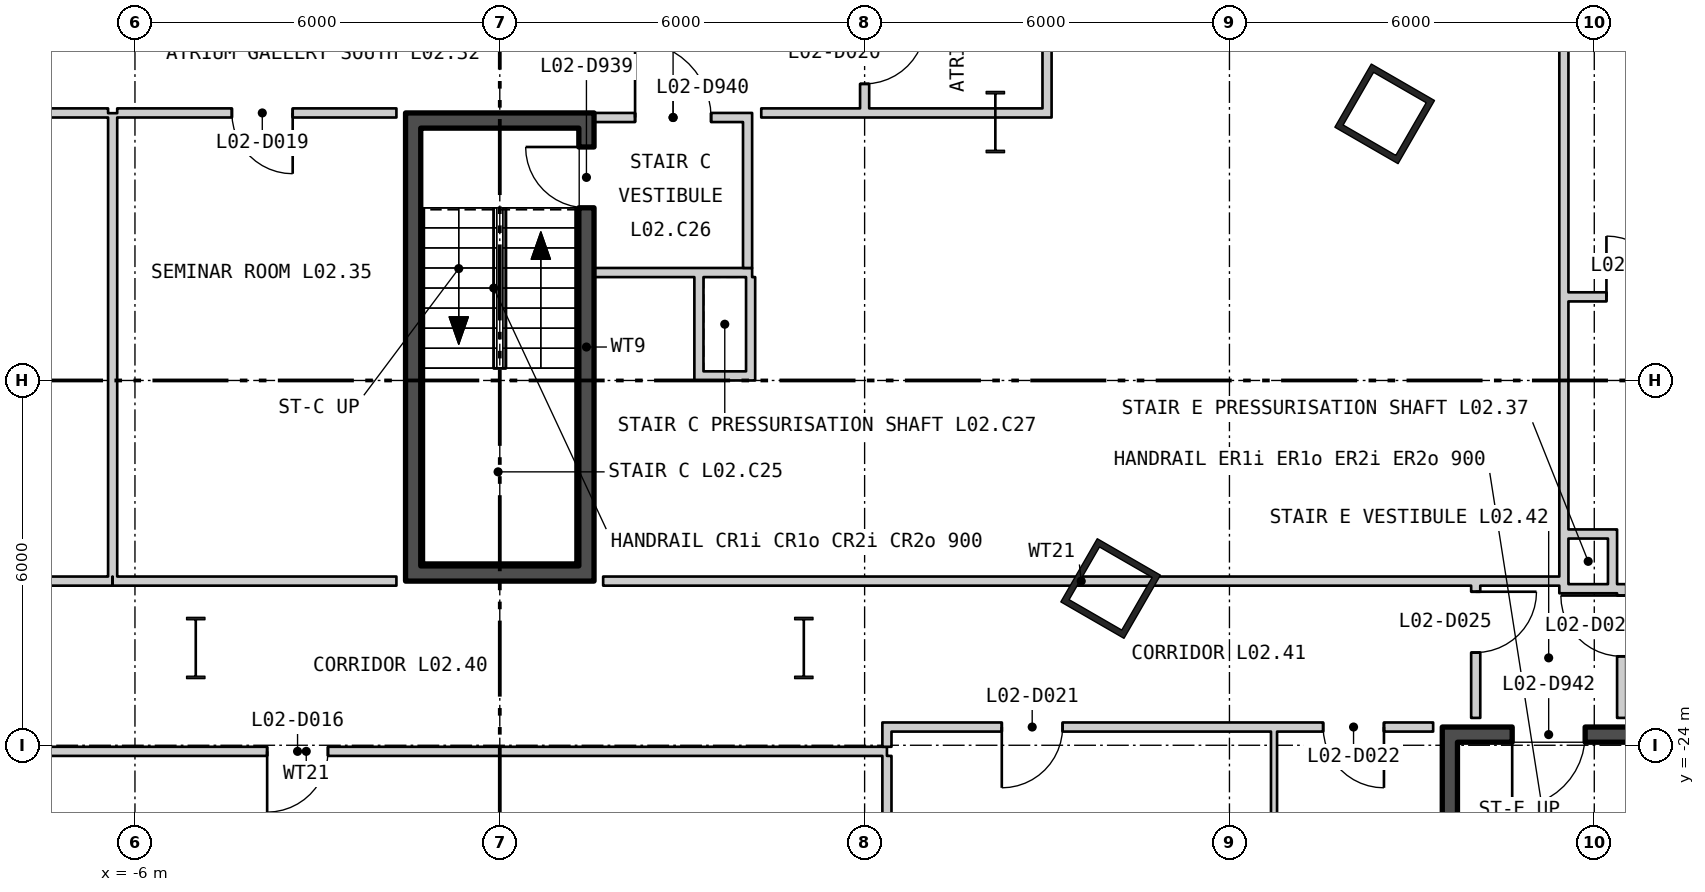
"""IFC4 building model, lengths in metres.
Left out: names, types, materials, properties, quantities, classifications, styles, units other than length and angle.
Written with IfcOpenShell. Run it as: python <this file> out.ifc"""

import sys

from ifc_helpers import new_model, si_unit, direction, frame, frame_2d, origin, origin_2d, place, context, subcontext, project, spatial, rectangle, hollow_rectangle, i_section, extrude, element, fill, save


model = new_model("IFC4")
c1 = context("Model", 3, precision=1e-05, world=origin(), true_north=direction((0.0, 1.0)))
c2 = subcontext(c1, "Body", "Model", "MODEL_VIEW")
j1 = project(units=[si_unit("LENGTHUNIT", "METRE"), si_unit("PLANEANGLEUNIT", "RADIAN")], contexts=[c1])
p1 = place(None, origin())
s1 = spatial("IfcSite", under=j1, at=p1, CompositionType="ELEMENT")
p2 = place(p1, origin())
s2 = spatial("IfcBuilding", under=s1, at=p2, CompositionType="ELEMENT")
p3 = place(p2, frame((0.0, 0.0, 13.5)))
s3 = spatial("IfcBuildingStorey", under=s2, at=p3, CompositionType="ELEMENT", Elevation=13.5)
for number, where, z_axis, x_axis in (
    (1, (10.046, -21.422, 0.0), (0.0, 0.0, 1.0), (0.5, 0.866, 0.0)),
    (2, (14.553, -13.615, 0.0), (0.0, 0.0, 1.0), (0.5, 0.866, 0.0)),
):
    element("IfcColumn", number, at=place(p3, frame(where, z_axis=z_axis, x_axis=x_axis)), inside=s3, PredefinedType="COLUMN", context=c2, shape_type="SweptSolid", body=[
        extrude(hollow_rectangle(XDim=1.2, YDim=1.2, WallThickness=0.1, at=origin_2d()), origin(), (0.0, 0.0, 1.0), 5.1),
    ])
for number, where, z_axis, x_axis in (
    (3, (8.15, -13.75, 0.0), (0.0, 0.0, 1.0), (1.0, 0.0, 0.0)),
    (4, (5.0, -22.4, 0.0), (0.0, 0.0, 1.0), (1.0, 0.0, 0.0)),
    (5, (-5.0, -22.4, 0.0), (0.0, 0.0, 1.0), (1.0, 0.0, 0.0)),
):
    element("IfcColumn", number, at=place(p3, frame(where, z_axis=z_axis, x_axis=x_axis)), inside=s3, PredefinedType="COLUMN", context=c2, shape_type="SweptSolid", body=[
        extrude(i_section(OverallWidth=0.302, OverallDepth=1.008, WebThickness=0.021, FlangeThickness=0.04, at=origin_2d()), origin(), (0.0, 0.0, 1.0), 5.1),
    ])
p4 = place(p3, frame((-1.425, -21.05, 0.0), z_axis=(0.0, 0.0, 1.0), x_axis=(0.0, 1.0, 0.0)))
e6 = element("IfcWall", 6, at=p4, inside=s3, PredefinedType="SHEAR", context=c2, shape_type="SweptSolid", body=[
    extrude(rectangle(XDim=7.2, YDim=0.25, at=frame_2d((3.6, 0.0))), origin(), (0.0, 0.0, 1.0), 4.88),
])
p5 = place(p3, frame((1.425, -21.05, 0.0), z_axis=(0.0, 0.0, 1.0), x_axis=(0.0, 1.0, 0.0)))
e7 = element("IfcWall", 7, at=p5, inside=s3, PredefinedType="SHEAR", context=c2, shape_type="SweptSolid", body=[
    extrude(rectangle(XDim=7.2, YDim=0.25, at=frame_2d((3.6, 0.0))), origin(), (0.0, 0.0, 1.0), 4.88),
])
p6 = place(p5, frame((5.89, 0.0, 0.0)))
e8 = element("IfcOpeningElement", 8, at=p6, cuts=e7, PredefinedType="OPENING", context=c2, shape_type="SweptSolid", body=[
    extrude(rectangle(XDim=1.0, YDim=2.1, at=frame_2d((0.5, 1.05))), frame((0.0, 0.135, 0.0), z_axis=(0.0, -1.0, 0.0), x_axis=(1.0, 0.0, 0.0)), (0.0, 0.0, 1.0), 0.27),
])
for number, where, z_axis, x_axis in (
    (9, (-1.55, -21.175, 0.0), (0.0, 0.0, 1.0), (1.0, 0.0, 0.0)),
    (10, (-1.55, -13.725, 0.0), (0.0, 0.0, 1.0), (1.0, 0.0, 0.0)),
):
    element("IfcWall", number, at=place(p3, frame(where, z_axis=z_axis, x_axis=x_axis)), inside=s3, PredefinedType="SHEAR", context=c2, shape_type="SweptSolid", body=[
        extrude(rectangle(XDim=3.1, YDim=0.25, at=frame_2d((1.55, 0.0))), origin(), (0.0, 0.0, 1.0), 4.88),
    ])
p7 = place(p3, frame((1.55, -16.225, 0.0), z_axis=(0.0, 0.0, 1.0), x_axis=(1.0, 0.0, 0.0)))
e11 = element("IfcWall", 11, at=p7, inside=s3, PredefinedType="PARTITIONING", context=c2, shape_type="SweptSolid", body=[
    extrude(rectangle(XDim=2.6, YDim=0.15, at=frame_2d((1.3, 0.0))), origin(), (0.0, 0.0, 1.0), 4.88),
])
p8 = place(p3, frame((4.075, -16.15, 0.0), z_axis=(0.0, 0.0, 1.0), x_axis=(0.0, 1.0, 0.0)))
e12 = element("IfcWall", 12, at=p8, inside=s3, PredefinedType="PARTITIONING", context=c2, shape_type="SweptSolid", body=[
    extrude(rectangle(XDim=2.4, YDim=0.15, at=frame_2d((1.2, 0.0))), origin(), (0.0, 0.0, 1.0), 4.88),
])
p9 = place(p3, frame((1.55, -13.675, 0.0), z_axis=(0.0, 0.0, 1.0), x_axis=(1.0, 0.0, 0.0)))
e13 = element("IfcWall", 13, at=p9, inside=s3, PredefinedType="PARTITIONING", context=c2, shape_type="SweptSolid", body=[
    extrude(rectangle(XDim=2.6, YDim=0.15, at=frame_2d((1.3, 0.0))), origin(), (0.0, 0.0, 1.0), 3.97),
])
p10 = place(p9, frame((0.675, 0.0, 0.0)))
e14 = element("IfcOpeningElement", 14, at=p10, cuts=e13, PredefinedType="OPENING", context=c2, shape_type="SweptSolid", body=[
    extrude(rectangle(XDim=1.25, YDim=2.1, at=frame_2d((0.625, 1.05))), frame((0.0, 0.085, 0.0), z_axis=(0.0, -1.0, 0.0), x_axis=(1.0, 0.0, 0.0)), (0.0, 0.0, 1.0), 0.17),
])
p11 = place(p3, frame((3.275, -18.0, 0.0), z_axis=(0.0, 0.0, 1.0), x_axis=(0.0, 1.0, 0.0)))
e15 = element("IfcWall", 15, at=p11, inside=s3, PredefinedType="PARTITIONING", context=c2, shape_type="SweptSolid", body=[
    extrude(rectangle(XDim=1.7, YDim=0.15, at=frame_2d((0.85, 0.0))), origin(), (0.0, 0.0, 1.0), 4.28),
])
p12 = place(p3, frame((3.35, -17.925, 0.0), z_axis=(0.0, 0.0, 1.0), x_axis=(1.0, 0.0, 0.0)))
e16 = element("IfcWall", 16, at=p12, inside=s3, PredefinedType="PARTITIONING", context=c2, shape_type="SweptSolid", body=[
    extrude(rectangle(XDim=0.7, YDim=0.15, at=frame_2d((0.35, 0.0))), origin(), (0.0, 0.0, 1.0), 4.88),
])
p13 = place(p3, frame((4.125, -18.0, 0.0), z_axis=(0.0, 0.0, 1.0), x_axis=(0.0, 1.0, 0.0)))
e17 = element("IfcWall", 17, at=p13, inside=s3, PredefinedType="PARTITIONING", context=c2, shape_type="SweptSolid", body=[
    extrude(rectangle(XDim=1.7, YDim=0.15, at=frame_2d((0.85, 0.0))), origin(), (0.0, 0.0, 1.0), 4.88),
])
p14 = place(p3, frame((15.625, -31.25, 0.0), z_axis=(0.0, 0.0, 1.0), x_axis=(0.0, 1.0, 0.0)))
e18 = element("IfcWall", 18, at=p14, inside=s3, PredefinedType="SHEAR", context=c2, shape_type="SweptSolid", body=[
    extrude(rectangle(XDim=7.3, YDim=0.25, at=frame_2d((3.65, 0.0))), origin(), (0.0, 0.0, 1.0), 4.88),
])
p15 = place(p3, frame((15.5, -23.825, 0.0), z_axis=(0.0, 0.0, 1.0), x_axis=(1.0, 0.0, 0.0)))
e19 = element("IfcWall", 19, at=p15, inside=s3, PredefinedType="SHEAR", context=c2, shape_type="SweptSolid", body=[
    extrude(rectangle(XDim=3.5, YDim=0.25, at=frame_2d((1.75, 0.0))), origin(), (0.0, 0.0, 1.0), 4.88),
])
p16 = place(p15, frame((1.15, 0.0, 0.0)))
e20 = element("IfcOpeningElement", 20, at=p16, cuts=e19, PredefinedType="OPENING", context=c2, shape_type="SweptSolid", body=[
    extrude(rectangle(XDim=1.2, YDim=2.1, at=frame_2d((0.6, 1.05))), frame((0.0, 0.135, 0.0), z_axis=(0.0, -1.0, 0.0), x_axis=(1.0, 0.0, 0.0)), (0.0, 0.0, 1.0), 0.27),
])
p17 = place(p3, frame((-17.025, -21.3, 0.0), z_axis=(0.0, 0.0, 1.0), x_axis=(1.0, 0.0, 0.0)))
e21 = element("IfcWall", 21, at=p17, inside=s3, PredefinedType="PARTITIONING", context=c2, shape_type="SweptSolid", body=[
    extrude(rectangle(XDim=10.654, YDim=0.15, at=frame_2d((5.327, 0.0))), origin(), (0.0, 0.0, 1.0), 4.88),
])
p18 = place(p3, frame((-12.733, -24.1, 0.0), z_axis=(0.0, 0.0, 1.0), x_axis=(1.0, 0.0, 0.0)))
e22 = element("IfcWall", 22, at=p18, inside=s3, PredefinedType="PARTITIONING", context=c2, shape_type="SweptSolid", body=[
    extrude(rectangle(XDim=19.1, YDim=0.15, at=frame_2d((9.55, 0.0))), origin(), (0.0, 0.0, 1.0), 4.88),
])
p19 = place(p18, frame((8.907, 0.0, 0.0)))
e23 = element("IfcOpeningElement", 23, at=p19, cuts=e22, PredefinedType="OPENING", context=c2, shape_type="SweptSolid", body=[
    extrude(rectangle(XDim=1.0, YDim=2.1, at=frame_2d((0.5, 1.05))), frame((0.0, 0.085, 0.0), z_axis=(0.0, -1.0, 0.0), x_axis=(1.0, 0.0, 0.0)), (0.0, 0.0, 1.0), 0.17),
])
p20 = place(p3, frame((-8.15, -13.6, 0.0), z_axis=(0.0, 0.0, 1.0), x_axis=(1.0, 0.0, 0.0)))
e24 = element("IfcWall", 24, at=p20, inside=s3, PredefinedType="PARTITIONING", context=c2, shape_type="SweptSolid", body=[
    extrude(rectangle(XDim=1.708, YDim=0.15, at=frame_2d((0.854, 0.0))), origin(), (0.0, 0.0, 1.0), 3.97),
])
p21 = place(p3, frame((-6.367, -21.3, 0.0), z_axis=(0.0, 0.0, 1.0), x_axis=(1.0, 0.0, 0.0)))
e25 = element("IfcWall", 25, at=p21, inside=s3, PredefinedType="PARTITIONING", context=c2, shape_type="SweptSolid", body=[
    extrude(rectangle(XDim=4.667, YDim=0.15, at=frame_2d((2.333, 0.0))), origin(), (0.0, 0.0, 1.0), 4.88),
])
p22 = place(p3, frame((-6.367, -21.225, 0.0), z_axis=(0.0, 0.0, 1.0), x_axis=(0.0, 1.0, 0.0)))
e26 = element("IfcWall", 26, at=p22, inside=s3, PredefinedType="PARTITIONING", context=c2, shape_type="SweptSolid", body=[
    extrude(rectangle(XDim=7.621, YDim=0.15, at=frame_2d((3.811, 0.0))), origin(), (0.0, 0.0, 1.0), 4.28),
])
p23 = place(p3, frame((-6.292, -13.6, 0.0), z_axis=(0.0, 0.0, 1.0), x_axis=(1.0, 0.0, 0.0)))
e27 = element("IfcWall", 27, at=p23, inside=s3, PredefinedType="PARTITIONING", context=c2, shape_type="SweptSolid", body=[
    extrude(rectangle(XDim=4.592, YDim=0.15, at=frame_2d((2.296, 0.0))), origin(), (0.0, 0.0, 1.0), 3.97),
])
p24 = place(p23, frame((1.886, 0.0, 0.0)))
e28 = element("IfcOpeningElement", 28, at=p24, cuts=e27, PredefinedType="OPENING", context=c2, shape_type="SweptSolid", body=[
    extrude(rectangle(XDim=1.0, YDim=2.1, at=frame_2d((0.5, 1.05))), frame((0.0, 0.085, 0.0), z_axis=(0.0, -1.0, 0.0), x_axis=(1.0, 0.0, 0.0)), (0.0, 0.0, 1.0), 0.17),
])
p25 = place(p3, frame((1.7, -21.3, 0.0), z_axis=(0.0, 0.0, 1.0), x_axis=(1.0, 0.0, 0.0)))
e29 = element("IfcWall", 29, at=p25, inside=s3, PredefinedType="PARTITIONING", context=c2, shape_type="SweptSolid", body=[
    extrude(rectangle(XDim=15.725, YDim=0.15, at=frame_2d((7.862, 0.0))), origin(), (0.0, 0.0, 1.0), 4.88),
])
p26 = place(p3, frame((4.3, -13.6, 0.0), z_axis=(0.0, 0.0, 1.0), x_axis=(1.0, 0.0, 0.0)))
e30 = element("IfcWall", 30, at=p26, inside=s3, PredefinedType="PARTITIONING", context=c2, shape_type="SweptSolid", body=[
    extrude(rectangle(XDim=3.85, YDim=0.15, at=frame_2d((1.925, 0.0))), origin(), (0.0, 0.0, 1.0), 3.97),
])
p27 = place(p3, frame((8.15, -13.6, 0.0), z_axis=(0.0, 0.0, 1.0), x_axis=(1.0, 0.0, 0.0)))
e31 = element("IfcWall", 31, at=p27, inside=s3, PredefinedType="PARTITIONING", context=c2, shape_type="SweptSolid", body=[
    extrude(rectangle(XDim=0.775, YDim=0.15, at=frame_2d((0.388, 0.0))), origin(), (0.0, 0.0, 1.0), 4.09),
])
p28 = place(p3, frame((6.0, -13.525, 0.0), z_axis=(0.0, 0.0, 1.0), x_axis=(0.0, 1.0, 0.0)))
e32 = element("IfcWall", 32, at=p28, inside=s3, PredefinedType="PARTITIONING", context=c2, shape_type="SweptSolid", body=[
    extrude(rectangle(XDim=1.805, YDim=0.15, at=frame_2d((0.902, 0.0))), origin(), (0.0, 0.0, 1.0), 4.88),
])
p29 = place(p28, frame((0.403, 0.0, 0.0)))
e33 = element("IfcOpeningElement", 33, at=p29, cuts=e32, PredefinedType="OPENING", context=c2, shape_type="SweptSolid", body=[
    extrude(rectangle(XDim=1.0, YDim=2.1, at=frame_2d((0.5, 1.05))), frame((0.0, 0.085, 0.0), z_axis=(0.0, -1.0, 0.0), x_axis=(1.0, 0.0, 0.0)), (0.0, 0.0, 1.0), 0.17),
])
p30 = place(p3, frame((6.367, -27.386, 0.0), z_axis=(0.0, 0.0, 1.0), x_axis=(0.000124571784, 0.999999992241, 0.0)))
e34 = element("IfcWall", 34, at=p30, inside=s3, PredefinedType="PARTITIONING", context=c2, shape_type="SweptSolid", body=[
    extrude(rectangle(XDim=3.211, YDim=0.15, at=frame_2d((1.605, 0.0))), origin(), (0.0, 0.0, 1.0), 4.28),
])
p31 = place(p3, frame((6.367, -24.025, 0.0), z_axis=(0.0, 0.0, 1.0), x_axis=(0.0, 1.0, 0.0)))
e35 = element("IfcWall", 35, at=p31, inside=s3, PredefinedType="PARTITIONING", context=c2, shape_type="SweptSolid", body=[
    extrude(rectangle(XDim=0.4, YDim=0.15, at=frame_2d((0.2, 0.0))), origin(), (0.0, 0.0, 1.0), 4.88),
])
p32 = place(p3, frame((6.442, -23.7, 0.0), z_axis=(0.0, 0.0, 1.0), x_axis=(1.0, 0.0, 0.0)))
e36 = element("IfcWall", 36, at=p32, inside=s3, PredefinedType="PARTITIONING", context=c2, shape_type="SweptSolid", body=[
    extrude(rectangle(XDim=8.908, YDim=0.15, at=frame_2d((4.454, 0.0))), origin(), (0.0, 0.0, 1.0), 4.88),
])
p33 = place(p32, frame((1.814, 0.0, 0.0)))
e37 = element("IfcOpeningElement", 37, at=p33, cuts=e36, PredefinedType="OPENING", context=c2, shape_type="SweptSolid", body=[
    extrude(rectangle(XDim=1.0, YDim=2.1, at=frame_2d((0.5, 1.05))), frame((0.0, 0.085, 0.0), z_axis=(0.0, -1.0, 0.0), x_axis=(1.0, 0.0, 0.0)), (0.0, 0.0, 1.0), 0.17),
])
p34 = place(p32, frame((7.099, 0.0, 0.0)))
e38 = element("IfcOpeningElement", 38, at=p34, cuts=e36, PredefinedType="OPENING", context=c2, shape_type="SweptSolid", body=[
    extrude(rectangle(XDim=1.0, YDim=2.1, at=frame_2d((0.5, 1.05))), frame((0.0, 0.085, 0.0), z_axis=(0.0, -1.0, 0.0), x_axis=(1.0, 0.0, 0.0)), (0.0, 0.0, 1.0), 0.17),
])
p35 = place(p3, frame((9.0, -13.675, 0.0), z_axis=(0.0, 0.0, 1.0), x_axis=(0.0, 1.0, 0.0)))
e39 = element("IfcWall", 39, at=p35, inside=s3, PredefinedType="PARTITIONING", context=c2, shape_type="SweptSolid", body=[
    extrude(rectangle(XDim=11.286, YDim=0.15, at=frame_2d((5.643, 0.0))), origin(), (0.0, 0.0, 1.0), 4.88),
])
p36 = place(p3, frame((12.733, -32.9, 0.0), z_axis=(0.0, 0.0, 1.0), x_axis=(0.0, 1.0, 0.0)))
e40 = element("IfcWall", 40, at=p36, inside=s3, PredefinedType="PARTITIONING", context=c2, shape_type="SweptSolid", body=[
    extrude(rectangle(XDim=9.125, YDim=0.1, at=frame_2d((4.562, 0.0))), origin(), (0.0, 0.0, 1.0), 4.19),
])
p37 = place(p3, frame((16.05, -23.55, 0.0), z_axis=(0.0, 0.0, 1.0), x_axis=(0.0, 1.0, 0.0)))
e41 = element("IfcWall", 41, at=p37, inside=s3, PredefinedType="PARTITIONING", context=c2, shape_type="SweptSolid", body=[
    extrude(rectangle(XDim=2.175, YDim=0.15, at=frame_2d((1.087, 0.0))), origin(), (0.0, 0.0, 1.0), 4.88),
])
p38 = place(p37, frame((1.075, 0.0, 0.0)))
e42 = element("IfcOpeningElement", 42, at=p38, cuts=e41, PredefinedType="OPENING", context=c2, shape_type="SweptSolid", body=[
    extrude(rectangle(XDim=1.0, YDim=2.1, at=frame_2d((0.5, 1.05))), frame((0.0, 0.085, 0.0), z_axis=(0.0, -1.0, 0.0), x_axis=(1.0, 0.0, 0.0)), (0.0, 0.0, 1.0), 0.17),
])
p39 = place(p3, frame((17.5, -21.5, 0.0), z_axis=(0.0, 0.0, 1.0), x_axis=(0.0, 1.0, 0.0)))
e43 = element("IfcWall", 43, at=p39, inside=s3, PredefinedType="PARTITIONING", context=c2, shape_type="SweptSolid", body=[
    extrude(rectangle(XDim=0.987, YDim=0.15, at=frame_2d((0.493, 0.0))), origin(), (0.0, 0.0, 1.0), 4.88),
])
p40 = place(p3, frame((17.5, -20.513, 0.0), z_axis=(0.0, 0.0, 1.0), x_axis=(0.0, 1.0, 0.0)))
e44 = element("IfcWall", 44, at=p40, inside=s3, PredefinedType="PARTITIONING", context=c2, shape_type="SweptSolid", body=[
    extrude(rectangle(XDim=8.288, YDim=0.15, at=frame_2d((4.144, 0.0))), origin(), (0.0, 0.0, 1.0), 4.88),
])
for number, where, z_axis, x_axis in (
    (45, (17.575, -21.425, 0.0), (0.0, 0.0, 1.0), (1.0, 0.0, 0.0)),
    (46, (17.575, -20.525, 0.0), (0.0, 0.0, 1.0), (1.0, 0.0, 0.0)),
):
    element("IfcWall", number, at=place(p3, frame(where, z_axis=z_axis, x_axis=x_axis)), inside=s3, PredefinedType="PARTITIONING", context=c2, shape_type="SweptSolid", body=[
        extrude(rectangle(XDim=0.65, YDim=0.15, at=frame_2d((0.325, 0.0))), origin(), (0.0, 0.0, 1.0), 4.88),
    ])
p41 = place(p3, frame((17.575, -16.625, 0.0), z_axis=(0.0, 0.0, 1.0), x_axis=(1.0, 0.0, 0.0)))
e47 = element("IfcWall", 47, at=p41, inside=s3, PredefinedType="PARTITIONING", context=c2, shape_type="SweptSolid", body=[
    extrude(rectangle(XDim=2.25, YDim=0.15, at=frame_2d((1.125, 0.0))), origin(), (0.0, 0.0, 1.0), 4.88),
])
p42 = place(p41, frame((0.625, 0.0, 0.0)))
e48 = element("IfcOpeningElement", 48, at=p42, cuts=e47, PredefinedType="OPENING", context=c2, shape_type="SweptSolid", body=[
    extrude(rectangle(XDim=1.0, YDim=2.1, at=frame_2d((0.5, 1.05))), frame((0.0, 0.085, 0.0), z_axis=(0.0, -1.0, 0.0), x_axis=(1.0, 0.0, 0.0)), (0.0, 0.0, 1.0), 0.17),
])
p43 = place(p3, frame((18.3, -21.5, 0.0), z_axis=(0.0, 0.0, 1.0), x_axis=(0.0, 1.0, 0.0)))
e49 = element("IfcWall", 49, at=p43, inside=s3, PredefinedType="PARTITIONING", context=c2, shape_type="SweptSolid", body=[
    extrude(rectangle(XDim=1.05, YDim=0.15, at=frame_2d((0.525, 0.0))), origin(), (0.0, 0.0, 1.0), 4.88),
])
p44 = place(p3, frame((18.45, -23.55, 0.0), z_axis=(0.0, 0.0, 1.0), x_axis=(0.0, 1.0, 0.0)))
e50 = element("IfcWall", 50, at=p44, inside=s3, PredefinedType="PARTITIONING", context=c2, shape_type="SweptSolid", body=[
    extrude(rectangle(XDim=2.2, YDim=0.15, at=frame_2d((1.1, 0.0))), origin(), (0.0, 0.0, 1.0), 4.88),
])
p45 = place(p44, frame((1.013, 0.0, 0.0)))
e51 = element("IfcOpeningElement", 51, at=p45, cuts=e50, PredefinedType="OPENING", context=c2, shape_type="SweptSolid", body=[
    extrude(rectangle(XDim=1.0, YDim=2.1, at=frame_2d((0.5, 1.05))), frame((0.0, 0.085, 0.0), z_axis=(0.0, -1.0, 0.0), x_axis=(1.0, 0.0, 0.0)), (0.0, 0.0, 1.0), 0.17),
])
p46 = place(p6, origin())
e52 = element("IfcDoor", 52, at=p46, inside=s3, OperationType="SINGLE_SWING_LEFT", PredefinedType="DOOR", context=c2, shape_type="SweptSolid", body=[
    extrude(rectangle(XDim=1.0, YDim=2.1, at=frame_2d((0.5, 1.05))), frame((0.0, 0.025, 0.0), z_axis=(0.0, -1.0, 0.0), x_axis=(1.0, 0.0, 0.0)), (0.0, 0.0, 1.0), 0.05),
])
fill(e8, e52)
p47 = place(p10, origin())
e53 = element("IfcDoor", 53, at=p47, inside=s3, OperationType="SINGLE_SWING_RIGHT", PredefinedType="DOOR", context=c2, shape_type="SweptSolid", body=[
    extrude(rectangle(XDim=1.25, YDim=2.1, at=frame_2d((0.625, 1.05))), frame((0.0, 0.025, 0.0), z_axis=(0.0, -1.0, 0.0), x_axis=(1.0, 0.0, 0.0)), (0.0, 0.0, 1.0), 0.05),
])
fill(e14, e53)
p48 = place(p16, origin())
e54 = element("IfcDoor", 54, at=p48, inside=s3, OperationType="SINGLE_SWING_LEFT", PredefinedType="DOOR", context=c2, shape_type="SweptSolid", body=[
    extrude(rectangle(XDim=1.2, YDim=2.1, at=frame_2d((0.6, 1.05))), frame((0.0, 0.025, 0.0), z_axis=(0.0, -1.0, 0.0), x_axis=(1.0, 0.0, 0.0)), (0.0, 0.0, 1.0), 0.05),
])
fill(e20, e54)
p49 = place(p19, origin())
e55 = element("IfcDoor", 55, at=p49, inside=s3, OperationType="SINGLE_SWING_LEFT", PredefinedType="DOOR", context=c2, shape_type="SweptSolid", body=[
    extrude(rectangle(XDim=1.0, YDim=2.1, at=frame_2d((0.5, 1.05))), frame((0.0, 0.025, 0.0), z_axis=(0.0, -1.0, 0.0), x_axis=(1.0, 0.0, 0.0)), (0.0, 0.0, 1.0), 0.05),
])
fill(e23, e55)
p50 = place(p24, origin())
e56 = element("IfcDoor", 56, at=p50, inside=s3, OperationType="SINGLE_SWING_RIGHT", PredefinedType="DOOR", context=c2, shape_type="SweptSolid", body=[
    extrude(rectangle(XDim=1.0, YDim=2.1, at=frame_2d((0.5, 1.05))), frame((0.0, 0.025, 0.0), z_axis=(0.0, -1.0, 0.0), x_axis=(1.0, 0.0, 0.0)), (0.0, 0.0, 1.0), 0.05),
])
fill(e28, e56)
p51 = place(p29, origin())
e57 = element("IfcDoor", 57, at=p51, inside=s3, OperationType="SINGLE_SWING_RIGHT", PredefinedType="DOOR", context=c2, shape_type="SweptSolid", body=[
    extrude(rectangle(XDim=1.0, YDim=2.1, at=frame_2d((0.5, 1.05))), frame((0.0, 0.025, 0.0), z_axis=(0.0, -1.0, 0.0), x_axis=(1.0, 0.0, 0.0)), (0.0, 0.0, 1.0), 0.05),
])
fill(e33, e57)
p52 = place(p33, origin())
e58 = element("IfcDoor", 58, at=p52, inside=s3, OperationType="SINGLE_SWING_LEFT", PredefinedType="DOOR", context=c2, shape_type="SweptSolid", body=[
    extrude(rectangle(XDim=1.0, YDim=2.1, at=frame_2d((0.5, 1.05))), frame((0.0, 0.025, 0.0), z_axis=(0.0, -1.0, 0.0), x_axis=(1.0, 0.0, 0.0)), (0.0, 0.0, 1.0), 0.05),
])
fill(e37, e58)
p53 = place(p34, origin())
e59 = element("IfcDoor", 59, at=p53, inside=s3, OperationType="SINGLE_SWING_RIGHT", PredefinedType="DOOR", context=c2, shape_type="SweptSolid", body=[
    extrude(rectangle(XDim=1.0, YDim=2.1, at=frame_2d((0.5, 1.05))), frame((0.0, 0.025, 0.0), z_axis=(0.0, -1.0, 0.0), x_axis=(1.0, 0.0, 0.0)), (0.0, 0.0, 1.0), 0.05),
])
fill(e38, e59)
p54 = place(p38, origin())
e60 = element("IfcDoor", 60, at=p54, inside=s3, OperationType="SINGLE_SWING_RIGHT", PredefinedType="DOOR", context=c2, shape_type="SweptSolid", body=[
    extrude(rectangle(XDim=1.0, YDim=2.1, at=frame_2d((0.5, 1.05))), frame((0.0, 0.025, 0.0), z_axis=(0.0, -1.0, 0.0), x_axis=(1.0, 0.0, 0.0)), (0.0, 0.0, 1.0), 0.05),
])
fill(e42, e60)
p55 = place(p42, origin())
e61 = element("IfcDoor", 61, at=p55, inside=s3, OperationType="SINGLE_SWING_RIGHT", PredefinedType="DOOR", context=c2, shape_type="SweptSolid", body=[
    extrude(rectangle(XDim=1.0, YDim=2.1, at=frame_2d((0.5, 1.05))), frame((0.0, 0.025, 0.0), z_axis=(0.0, -1.0, 0.0), x_axis=(1.0, 0.0, 0.0)), (0.0, 0.0, 1.0), 0.05),
])
fill(e48, e61)
p56 = place(p45, origin())
e62 = element("IfcDoor", 62, at=p56, inside=s3, OperationType="SINGLE_SWING_LEFT", PredefinedType="DOOR", context=c2, shape_type="SweptSolid", body=[
    extrude(rectangle(XDim=1.0, YDim=2.1, at=frame_2d((0.5, 1.05))), frame((0.0, 0.025, 0.0), z_axis=(0.0, -1.0, 0.0), x_axis=(1.0, 0.0, 0.0)), (0.0, 0.0, 1.0), 0.05),
])
fill(e51, e62)
save(model, sys.argv[1])
